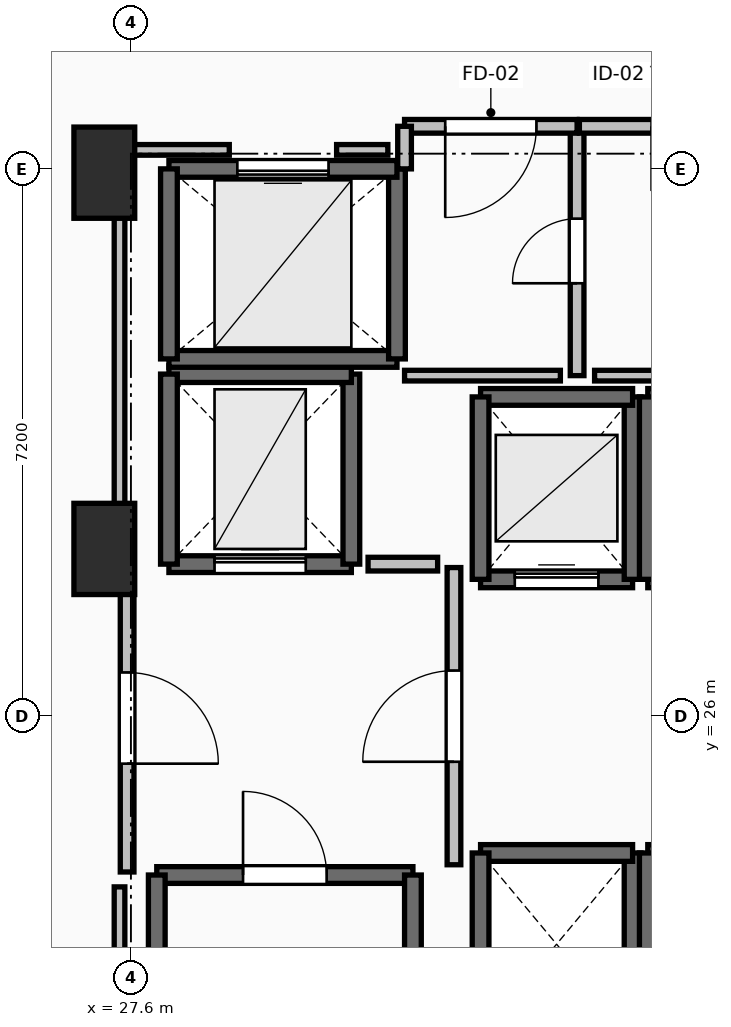
"""IFC4 building model, lengths in metres.
Left out: names, types, materials, properties, quantities, classifications, styles, units other than length and angle.
Written with IfcOpenShell. Run it as: python <this file> out.ifc"""

import sys

from ifc_helpers import new_model, si_unit, direction, frame, frame_2d, origin, origin_2d, place, context, subcontext, project, spatial, rectangle, extrude, element, fill, save


model = new_model("IFC4")
c1 = context("Model", 3, precision=1e-05, world=origin(), true_north=direction((0.0, 1.0)))
c2 = subcontext(c1, "Body", "Model", "MODEL_VIEW")
j1 = project(units=[si_unit("LENGTHUNIT", "METRE"), si_unit("PLANEANGLEUNIT", "RADIAN")], contexts=[c1])
p1 = place(None, origin())
s1 = spatial("IfcSite", under=j1, at=p1, CompositionType="ELEMENT")
p2 = place(p1, origin())
s2 = spatial("IfcBuilding", under=s1, at=p2, CompositionType="ELEMENT")
p3 = place(p2, frame((0.0, 0.0, 82.3)))
s3 = spatial("IfcBuildingStorey", under=s2, at=p3, CompositionType="ELEMENT", Elevation=82.3)
for number, where, z_axis, x_axis in (
    (1, (27.25, 28.2, 0.0), (0.0, 0.0, 1.0), (1.0, 0.0, 0.0)),
    (2, (27.25, 33.15, 0.0), (0.0, 0.0, 1.0), (1.0, 0.0, 0.0)),
):
    element("IfcColumn", number, at=place(p3, frame(where, z_axis=z_axis, x_axis=x_axis)), inside=s3, PredefinedType="PILASTER", context=c2, shape_type="SweptSolid", body=[
        extrude(rectangle(XDim=0.8, YDim=1.2, at=origin_2d()), origin(), (0.0, 0.0, 1.0), 3.5),
    ])
p4 = place(p3, frame((27.94, 23.91, 0.0), z_axis=(0.0, 0.0, 1.0), x_axis=(1.0, 0.0, 0.0)))
e3 = element("IfcWall", 3, at=p4, inside=s3, PredefinedType="SOLIDWALL", context=c2, shape_type="SweptSolid", body=[
    extrude(rectangle(XDim=3.37, YDim=0.22, at=frame_2d((1.685, 0.0))), origin(), (0.0, 0.0, 1.0), 3.24),
])
p5 = place(p4, frame((1.135, 0.0, 0.0)))
e4 = element("IfcOpeningElement", 4, at=p5, cuts=e3, PredefinedType="OPENING", context=c2, shape_type="SweptSolid", body=[
    extrude(rectangle(XDim=1.1, YDim=2.15, at=frame_2d((0.55, 1.075))), frame((0.0, 0.125, 0.0), z_axis=(0.0, -1.0, 0.0), x_axis=(1.0, 0.0, 0.0)), (0.0, 0.0, 1.0), 0.25),
])
for number, where, z_axis, x_axis in (
    (5, (31.31, 23.91, 0.0), (0.0, 0.0, 1.0), (0.0, -1.0, 0.0)),
    (6, (27.94, 16.49, 0.0), (0.0, 0.0, 1.0), (0.0, 1.0, 0.0)),
):
    element("IfcWall", number, at=place(p3, frame(where, z_axis=z_axis, x_axis=x_axis)), inside=s3, PredefinedType="SOLIDWALL", context=c2, shape_type="SweptSolid", body=[
        extrude(rectangle(XDim=7.42, YDim=0.22, at=frame_2d((3.71, 0.0))), origin(), (0.0, 0.0, 1.0), 3.24),
    ])
p6 = place(p3, frame((32.2, 27.8, 0.0), z_axis=(0.0, 0.0, 1.0), x_axis=(1.0, 0.0, 0.0)))
e7 = element("IfcWall", 7, at=p6, inside=s3, PredefinedType="SOLIDWALL", context=c2, shape_type="SweptSolid", body=[
    extrude(rectangle(XDim=2.0, YDim=0.22, at=frame_2d((1.0, 0.0))), origin(), (0.0, 0.0, 1.0), 3.24),
])
p7 = place(p6, frame((0.45, 0.0, 0.0)))
e8 = element("IfcOpeningElement", 8, at=p7, cuts=e7, PredefinedType="OPENING", context=c2, shape_type="SweptSolid", body=[
    extrude(rectangle(XDim=1.1, YDim=2.2, at=frame_2d((0.55, 1.1))), frame((0.0, 0.125, 0.0), z_axis=(0.0, -1.0, 0.0), x_axis=(1.0, 0.0, 0.0)), (0.0, 0.0, 1.0), 0.25),
])
p8 = place(p3, frame((34.2, 27.8, 0.0), z_axis=(0.0, 0.0, 1.0), x_axis=(0.0, 1.0, 0.0)))
e9 = element("IfcWall", 9, at=p8, inside=s3, PredefinedType="SOLIDWALL", context=c2, shape_type="SweptSolid", body=[
    extrude(rectangle(XDim=2.4, YDim=0.22, at=frame_2d((1.2, 0.0))), origin(), (0.0, 0.0, 1.0), 3.24),
])
p9 = place(p3, frame((34.2, 30.2, 0.0), z_axis=(0.0, 0.0, 1.0), x_axis=(-1.0, 0.0, 0.0)))
e10 = element("IfcWall", 10, at=p9, inside=s3, PredefinedType="SOLIDWALL", context=c2, shape_type="SweptSolid", body=[
    extrude(rectangle(XDim=2.0, YDim=0.22, at=frame_2d((1.0, 0.0))), origin(), (0.0, 0.0, 1.0), 3.24),
])
p10 = place(p3, frame((32.2, 30.2, 0.0), z_axis=(0.0, 0.0, 1.0), x_axis=(0.0, -1.0, 0.0)))
e11 = element("IfcWall", 11, at=p10, inside=s3, PredefinedType="SOLIDWALL", context=c2, shape_type="SweptSolid", body=[
    extrude(rectangle(XDim=2.4, YDim=0.22, at=frame_2d((1.2, 0.0))), origin(), (0.0, 0.0, 1.0), 3.24),
])
p11 = place(p3, frame((34.4, 27.8, 0.0), z_axis=(0.0, 0.0, 1.0), x_axis=(1.0, 0.0, 0.0)))
e12 = element("IfcWall", 12, at=p11, inside=s3, PredefinedType="SOLIDWALL", context=c2, shape_type="SweptSolid", body=[
    extrude(rectangle(XDim=2.0, YDim=0.22, at=frame_2d((1.0, 0.0))), origin(), (0.0, 0.0, 1.0), 3.24),
])
p12 = place(p11, frame((0.45, 0.0, 0.0)))
e13 = element("IfcOpeningElement", 13, at=p12, cuts=e12, PredefinedType="OPENING", context=c2, shape_type="SweptSolid", body=[
    extrude(rectangle(XDim=1.1, YDim=2.2, at=frame_2d((0.55, 1.1))), frame((0.0, 0.125, 0.0), z_axis=(0.0, -1.0, 0.0), x_axis=(1.0, 0.0, 0.0)), (0.0, 0.0, 1.0), 0.25),
])
p13 = place(p3, frame((36.4, 30.2, 0.0), z_axis=(0.0, 0.0, 1.0), x_axis=(-1.0, 0.0, 0.0)))
e14 = element("IfcWall", 14, at=p13, inside=s3, PredefinedType="SOLIDWALL", context=c2, shape_type="SweptSolid", body=[
    extrude(rectangle(XDim=2.0, YDim=0.22, at=frame_2d((1.0, 0.0))), origin(), (0.0, 0.0, 1.0), 3.24),
])
for number, where, z_axis, x_axis in (
    (15, (34.4, 30.2, 0.0), (0.0, 0.0, 1.0), (0.0, -1.0, 0.0)),
    (16, (34.2, 21.8, 0.0), (0.0, 0.0, 1.0), (0.0, 1.0, 0.0)),
):
    element("IfcWall", number, at=place(p3, frame(where, z_axis=z_axis, x_axis=x_axis)), inside=s3, PredefinedType="SOLIDWALL", context=c2, shape_type="SweptSolid", body=[
        extrude(rectangle(XDim=2.4, YDim=0.22, at=frame_2d((1.2, 0.0))), origin(), (0.0, 0.0, 1.0), 3.24),
    ])
p14 = place(p3, frame((34.2, 24.2, 0.0), z_axis=(0.0, 0.0, 1.0), x_axis=(-1.0, 0.0, 0.0)))
e17 = element("IfcWall", 17, at=p14, inside=s3, PredefinedType="SOLIDWALL", context=c2, shape_type="SweptSolid", body=[
    extrude(rectangle(XDim=2.0, YDim=0.22, at=frame_2d((1.0, 0.0))), origin(), (0.0, 0.0, 1.0), 3.24),
])
p15 = place(p3, frame((32.2, 24.2, 0.0), z_axis=(0.0, 0.0, 1.0), x_axis=(0.0, -1.0, 0.0)))
e18 = element("IfcWall", 18, at=p15, inside=s3, PredefinedType="SOLIDWALL", context=c2, shape_type="SweptSolid", body=[
    extrude(rectangle(XDim=2.4, YDim=0.22, at=frame_2d((1.2, 0.0))), origin(), (0.0, 0.0, 1.0), 3.24),
])
p16 = place(p3, frame((36.4, 24.2, 0.0), z_axis=(0.0, 0.0, 1.0), x_axis=(-1.0, 0.0, 0.0)))
e19 = element("IfcWall", 19, at=p16, inside=s3, PredefinedType="SOLIDWALL", context=c2, shape_type="SweptSolid", body=[
    extrude(rectangle(XDim=2.0, YDim=0.22, at=frame_2d((1.0, 0.0))), origin(), (0.0, 0.0, 1.0), 3.24),
])
p17 = place(p3, frame((34.4, 24.2, 0.0), z_axis=(0.0, 0.0, 1.0), x_axis=(0.0, -1.0, 0.0)))
e20 = element("IfcWall", 20, at=p17, inside=s3, PredefinedType="SOLIDWALL", context=c2, shape_type="SweptSolid", body=[
    extrude(rectangle(XDim=2.4, YDim=0.22, at=frame_2d((1.2, 0.0))), origin(), (0.0, 0.0, 1.0), 3.24),
])
p18 = place(p3, frame((28.1, 28.0, 0.0), z_axis=(0.0, 0.0, 1.0), x_axis=(1.0, 0.0, 0.0)))
e21 = element("IfcWall", 21, at=p18, inside=s3, PredefinedType="SHEAR", context=c2, shape_type="SweptSolid", body=[
    extrude(rectangle(XDim=2.4, YDim=0.22, at=frame_2d((1.2, 0.0))), origin(), (0.0, 0.0, 1.0), 3.24),
])
p19 = place(p18, frame((0.6, 0.0, 0.0)))
e22 = element("IfcOpeningElement", 22, at=p19, cuts=e21, PredefinedType="OPENING", context=c2, shape_type="SweptSolid", body=[
    extrude(rectangle(XDim=1.2, YDim=2.2, at=frame_2d((0.6, 1.1))), frame((0.0, 0.125, 0.0), z_axis=(0.0, -1.0, 0.0), x_axis=(1.0, 0.0, 0.0)), (0.0, 0.0, 1.0), 0.25),
])
p20 = place(p3, frame((30.5, 28.0, 0.0), z_axis=(0.0, 0.0, 1.0), x_axis=(0.0, 1.0, 0.0)))
e23 = element("IfcWall", 23, at=p20, inside=s3, PredefinedType="SHEAR", context=c2, shape_type="SweptSolid", body=[
    extrude(rectangle(XDim=2.5, YDim=0.22, at=frame_2d((1.25, 0.0))), origin(), (0.0, 0.0, 1.0), 3.24),
])
p21 = place(p3, frame((30.5, 30.5, 0.0), z_axis=(0.0, 0.0, 1.0), x_axis=(-1.0, 0.0, 0.0)))
e24 = element("IfcWall", 24, at=p21, inside=s3, PredefinedType="SHEAR", context=c2, shape_type="SweptSolid", body=[
    extrude(rectangle(XDim=2.4, YDim=0.22, at=frame_2d((1.2, 0.0))), origin(), (0.0, 0.0, 1.0), 3.24),
])
p22 = place(p3, frame((28.1, 30.5, 0.0), z_axis=(0.0, 0.0, 1.0), x_axis=(0.0, -1.0, 0.0)))
e25 = element("IfcWall", 25, at=p22, inside=s3, PredefinedType="SHEAR", context=c2, shape_type="SweptSolid", body=[
    extrude(rectangle(XDim=2.5, YDim=0.22, at=frame_2d((1.25, 0.0))), origin(), (0.0, 0.0, 1.0), 3.24),
])
p23 = place(p3, frame((28.1, 30.7, 0.0), z_axis=(0.0, 0.0, 1.0), x_axis=(1.0, 0.0, 0.0)))
e26 = element("IfcWall", 26, at=p23, inside=s3, PredefinedType="SOLIDWALL", context=c2, shape_type="SweptSolid", body=[
    extrude(rectangle(XDim=3.0, YDim=0.22, at=frame_2d((1.5, 0.0))), origin(), (0.0, 0.0, 1.0), 3.24),
])
p24 = place(p3, frame((31.1, 30.7, 0.0), z_axis=(0.0, 0.0, 1.0), x_axis=(0.0, 1.0, 0.0)))
e27 = element("IfcWall", 27, at=p24, inside=s3, PredefinedType="SOLIDWALL", context=c2, shape_type="SweptSolid", body=[
    extrude(rectangle(XDim=2.5, YDim=0.22, at=frame_2d((1.25, 0.0))), origin(), (0.0, 0.0, 1.0), 3.24),
])
p25 = place(p3, frame((31.1, 33.2, 0.0), z_axis=(0.0, 0.0, 1.0), x_axis=(-1.0, 0.0, 0.0)))
e28 = element("IfcWall", 28, at=p25, inside=s3, PredefinedType="SOLIDWALL", context=c2, shape_type="SweptSolid", body=[
    extrude(rectangle(XDim=3.0, YDim=0.22, at=frame_2d((1.5, 0.0))), origin(), (0.0, 0.0, 1.0), 3.24),
])
p26 = place(p25, frame((0.9, 0.0, 0.0)))
e29 = element("IfcOpeningElement", 29, at=p26, cuts=e28, PredefinedType="OPENING", context=c2, shape_type="SweptSolid", body=[
    extrude(rectangle(XDim=1.2, YDim=2.2, at=frame_2d((0.6, 1.1))), frame((0.0, 0.125, 0.0), z_axis=(0.0, -1.0, 0.0), x_axis=(1.0, 0.0, 0.0)), (0.0, 0.0, 1.0), 0.25),
])
p27 = place(p3, frame((28.1, 33.2, 0.0), z_axis=(0.0, 0.0, 1.0), x_axis=(0.0, -1.0, 0.0)))
e30 = element("IfcWall", 30, at=p27, inside=s3, PredefinedType="SOLIDWALL", context=c2, shape_type="SweptSolid", body=[
    extrude(rectangle(XDim=2.5, YDim=0.22, at=frame_2d((1.25, 0.0))), origin(), (0.0, 0.0, 1.0), 3.24),
])
p28 = place(p3, frame((31.85, 24.045, 0.0), z_axis=(0.0, 0.0, 1.0), x_axis=(0.0, 1.0, 0.0)))
e31 = element("IfcWall", 31, at=p28, inside=s3, PredefinedType="PARTITIONING", context=c2, shape_type="SweptSolid", body=[
    extrude(rectangle(XDim=3.91, YDim=0.18, at=frame_2d((1.955, 0.0))), origin(), (0.0, 0.0, 1.0), 3.24),
])
p29 = place(p28, frame((1.355, 0.0, 0.0)))
e32 = element("IfcOpeningElement", 32, at=p29, cuts=e31, PredefinedType="OPENING", context=c2, shape_type="SweptSolid", body=[
    extrude(rectangle(XDim=1.2, YDim=2.15, at=frame_2d((0.6, 1.075))), frame((0.0, 0.105, 0.0), z_axis=(0.0, -1.0, 0.0), x_axis=(1.0, 0.0, 0.0)), (0.0, 0.0, 1.0), 0.21),
])
p30 = place(p3, frame((27.55, 28.0, 0.0), z_axis=(0.0, 0.0, 1.0), x_axis=(0.0, -1.0, 0.0)))
e33 = element("IfcWall", 33, at=p30, inside=s3, PredefinedType="PARTITIONING", context=c2, shape_type="SweptSolid", body=[
    extrude(rectangle(XDim=4.05, YDim=0.18, at=frame_2d((2.025, 0.0))), origin(), (0.0, 0.0, 1.0), 3.24),
])
p31 = place(p30, frame((1.425, 0.0, 0.0)))
e34 = element("IfcOpeningElement", 34, at=p31, cuts=e33, PredefinedType="OPENING", context=c2, shape_type="SweptSolid", body=[
    extrude(rectangle(XDim=1.2, YDim=2.15, at=frame_2d((0.6, 1.075))), frame((0.0, 0.105, 0.0), z_axis=(0.0, -1.0, 0.0), x_axis=(1.0, 0.0, 0.0)), (0.0, 0.0, 1.0), 0.21),
])
p32 = place(p3, frame((33.47, 30.48, 0.0), z_axis=(0.0, 0.0, 1.0), x_axis=(0.0, 1.0, 0.0)))
e35 = element("IfcWall", 35, at=p32, inside=s3, PredefinedType="PARTITIONING", context=c2, shape_type="SweptSolid", body=[
    extrude(rectangle(XDim=3.28, YDim=0.18, at=frame_2d((1.64, 0.0))), origin(), (0.0, 0.0, 1.0), 3.24),
])
p33 = place(p32, frame((1.215, 0.0, 0.0)))
e36 = element("IfcOpeningElement", 36, at=p33, cuts=e35, PredefinedType="OPENING", context=c2, shape_type="SweptSolid", body=[
    extrude(rectangle(XDim=0.85, YDim=2.1, at=frame_2d((0.425, 1.05))), frame((0.0, 0.105, 0.0), z_axis=(0.0, -1.0, 0.0), x_axis=(1.0, 0.0, 0.0)), (0.0, 0.0, 1.0), 0.21),
])
p34 = place(p3, frame((33.47, 33.76, 0.0), z_axis=(0.0, 0.0, 1.0), x_axis=(-1.0, 0.0, 0.0)))
e37 = element("IfcWall", 37, at=p34, inside=s3, PredefinedType="PARTITIONING", context=c2, shape_type="SweptSolid", body=[
    extrude(rectangle(XDim=2.27, YDim=0.18, at=frame_2d((1.135, 0.0))), origin(), (0.0, 0.0, 1.0), 3.24),
])
p35 = place(p34, frame((0.535, 0.0, 0.0)))
e38 = element("IfcOpeningElement", 38, at=p35, cuts=e37, PredefinedType="OPENING", context=c2, shape_type="SweptSolid", body=[
    extrude(rectangle(XDim=1.2, YDim=2.15, at=frame_2d((0.6, 1.075))), frame((0.0, 0.105, 0.0), z_axis=(0.0, -1.0, 0.0), x_axis=(1.0, 0.0, 0.0)), (0.0, 0.0, 1.0), 0.21),
])
p36 = place(p3, frame((31.2, 33.76, 0.0), z_axis=(0.0, 0.0, 1.0), x_axis=(0.0, -1.0, 0.0)))
e39 = element("IfcWall", 39, at=p36, inside=s3, PredefinedType="PARTITIONING", context=c2, shape_type="SweptSolid", body=[
    extrude(rectangle(XDim=0.56, YDim=0.18, at=frame_2d((0.28, 0.0))), origin(), (0.0, 0.0, 1.0), 3.24),
])
p37 = place(p3, frame((36.25, 33.76, 0.0), z_axis=(0.0, 0.0, 1.0), x_axis=(-1.0, 0.0, 0.0)))
e40 = element("IfcWall", 40, at=p37, inside=s3, PredefinedType="PARTITIONING", context=c2, shape_type="SweptSolid", body=[
    extrude(rectangle(XDim=2.75, YDim=0.18, at=frame_2d((1.375, 0.0))), origin(), (0.0, 0.0, 1.0), 3.24),
])
p38 = place(p37, frame((0.95, 0.0, 0.0)))
e41 = element("IfcOpeningElement", 41, at=p38, cuts=e40, PredefinedType="OPENING", context=c2, shape_type="SweptSolid", body=[
    extrude(rectangle(XDim=0.85, YDim=2.1, at=frame_2d((0.425, 1.05))), frame((0.0, 0.105, 0.0), z_axis=(0.0, -1.0, 0.0), x_axis=(1.0, 0.0, 0.0)), (0.0, 0.0, 1.0), 0.21),
])
p39 = place(p3, frame((31.635, 28.0, 0.0), z_axis=(0.0, 0.0, 1.0), x_axis=(-1.0, 0.0, 0.0)))
e42 = element("IfcWall", 42, at=p39, inside=s3, PredefinedType="PARTITIONING", context=c2, shape_type="SweptSolid", body=[
    extrude(rectangle(XDim=0.915, YDim=0.18, at=frame_2d((0.458, 0.0))), origin(), (0.0, 0.0, 1.0), 3.24),
])
p40 = place(p3, frame((31.2, 30.48, 0.0), z_axis=(0.0, 0.0, 1.0), x_axis=(1.0, 0.0, 0.0)))
e43 = element("IfcWall", 43, at=p40, inside=s3, PredefinedType="PARTITIONING", context=c2, shape_type="SweptSolid", body=[
    extrude(rectangle(XDim=2.05, YDim=0.14, at=frame_2d((1.025, 0.0))), origin(), (0.0, 0.0, 1.0), 3.24),
])
p41 = place(p3, frame((33.7, 30.48, 0.0), z_axis=(0.0, 0.0, 1.0), x_axis=(1.0, 0.0, 0.0)))
e44 = element("IfcWall", 44, at=p41, inside=s3, PredefinedType="PARTITIONING", context=c2, shape_type="SweptSolid", body=[
    extrude(rectangle(XDim=2.33, YDim=0.14, at=frame_2d((1.165, 0.0))), origin(), (0.0, 0.0, 1.0), 2.432),
])
p42 = place(p3, frame((27.45, 16.24, 0.0), z_axis=(0.0, 0.0, 1.0), x_axis=(0.0, 1.0, 0.0)))
e45 = element("IfcWall", 45, at=p42, inside=s3, PredefinedType="PARTITIONING", context=c2, shape_type="SweptSolid", body=[
    extrude(rectangle(XDim=7.514, YDim=0.14, at=frame_2d((3.757, 0.0))), origin(), (0.0, 0.0, 1.0), 2.432),
])
p43 = place(p3, frame((27.45, 28.196, 0.0), z_axis=(0.0, 0.0, 1.0), x_axis=(0.0, 1.0, 0.0)))
e46 = element("IfcWall", 46, at=p43, inside=s3, PredefinedType="PARTITIONING", context=c2, shape_type="SweptSolid", body=[
    extrude(rectangle(XDim=5.254, YDim=0.14, at=frame_2d((2.627, 0.0))), origin(), (0.0, 0.0, 1.0), 2.432),
])
p44 = place(p3, frame((27.45, 33.45, 0.0), z_axis=(0.0, 0.0, 1.0), x_axis=(1.0, 0.0, 0.0)))
e47 = element("IfcWall", 47, at=p44, inside=s3, PredefinedType="PARTITIONING", context=c2, shape_type="SweptSolid", body=[
    extrude(rectangle(XDim=1.444, YDim=0.14, at=frame_2d((0.722, 0.0))), origin(), (0.0, 0.0, 1.0), 2.432),
])
p45 = place(p3, frame((30.306, 33.45, 0.0), z_axis=(0.0, 0.0, 1.0), x_axis=(1.0, 0.0, 0.0)))
e48 = element("IfcWall", 48, at=p45, inside=s3, PredefinedType="PARTITIONING", context=c2, shape_type="SweptSolid", body=[
    extrude(rectangle(XDim=0.674, YDim=0.14, at=frame_2d((0.337, 0.0))), origin(), (0.0, 0.0, 1.0), 3.24),
])
p46 = place(p5, origin())
e49 = element("IfcDoor", 49, at=p46, inside=s3, OperationType="SINGLE_SWING_LEFT", PredefinedType="DOOR", context=c2, shape_type="SweptSolid", body=[
    extrude(rectangle(XDim=1.1, YDim=2.15, at=frame_2d((0.55, 1.075))), frame((0.0, 0.025, 0.0), z_axis=(0.0, -1.0, 0.0), x_axis=(1.0, 0.0, 0.0)), (0.0, 0.0, 1.0), 0.05),
])
fill(e4, e49)
p47 = place(p7, origin())
e50 = element("IfcDoor", 50, at=p47, inside=s3, OperationType="SLIDING_TO_LEFT", PredefinedType="DOOR", context=c2, shape_type="SweptSolid", body=[
    extrude(rectangle(XDim=1.1, YDim=2.2, at=frame_2d((0.55, 1.1))), frame((0.0, 0.025, 0.0), z_axis=(0.0, -1.0, 0.0), x_axis=(1.0, 0.0, 0.0)), (0.0, 0.0, 1.0), 0.05),
])
fill(e8, e50)
p48 = place(p19, origin())
e51 = element("IfcDoor", 51, at=p48, inside=s3, OperationType="SLIDING_TO_LEFT", PredefinedType="DOOR", context=c2, shape_type="SweptSolid", body=[
    extrude(rectangle(XDim=1.2, YDim=2.2, at=frame_2d((0.6, 1.1))), frame((0.0, 0.025, 0.0), z_axis=(0.0, -1.0, 0.0), x_axis=(1.0, 0.0, 0.0)), (0.0, 0.0, 1.0), 0.05),
])
fill(e22, e51)
p49 = place(p26, origin())
e52 = element("IfcDoor", 52, at=p49, inside=s3, OperationType="SLIDING_TO_LEFT", PredefinedType="DOOR", context=c2, shape_type="SweptSolid", body=[
    extrude(rectangle(XDim=1.2, YDim=2.2, at=frame_2d((0.6, 1.1))), frame((0.0, 0.025, 0.0), z_axis=(0.0, -1.0, 0.0), x_axis=(1.0, 0.0, 0.0)), (0.0, 0.0, 1.0), 0.05),
])
fill(e29, e52)
p50 = place(p29, origin())
e53 = element("IfcDoor", 53, at=p50, inside=s3, OperationType="SINGLE_SWING_LEFT", PredefinedType="DOOR", context=c2, shape_type="SweptSolid", body=[
    extrude(rectangle(XDim=1.2, YDim=2.15, at=frame_2d((0.6, 1.075))), frame((0.0, 0.025, 0.0), z_axis=(0.0, -1.0, 0.0), x_axis=(1.0, 0.0, 0.0)), (0.0, 0.0, 1.0), 0.05),
])
fill(e32, e53)
p51 = place(p31, origin())
e54 = element("IfcDoor", 54, at=p51, inside=s3, OperationType="SINGLE_SWING_RIGHT", PredefinedType="DOOR", context=c2, shape_type="SweptSolid", body=[
    extrude(rectangle(XDim=1.2, YDim=2.15, at=frame_2d((0.6, 1.075))), frame((0.0, 0.025, 0.0), z_axis=(0.0, -1.0, 0.0), x_axis=(1.0, 0.0, 0.0)), (0.0, 0.0, 1.0), 0.05),
])
fill(e34, e54)
p52 = place(p33, origin())
e55 = element("IfcDoor", 55, at=p52, inside=s3, OperationType="SINGLE_SWING_LEFT", PredefinedType="DOOR", context=c2, shape_type="SweptSolid", body=[
    extrude(rectangle(XDim=0.85, YDim=2.1, at=frame_2d((0.425, 1.05))), frame((0.0, 0.025, 0.0), z_axis=(0.0, -1.0, 0.0), x_axis=(1.0, 0.0, 0.0)), (0.0, 0.0, 1.0), 0.05),
])
fill(e36, e55)
p53 = place(p35, origin())
e56 = element("IfcDoor", 56, at=p53, inside=s3, OperationType="SINGLE_SWING_RIGHT", PredefinedType="DOOR", context=c2, shape_type="SweptSolid", body=[
    extrude(rectangle(XDim=1.2, YDim=2.15, at=frame_2d((0.6, 1.075))), frame((0.0, 0.025, 0.0), z_axis=(0.0, -1.0, 0.0), x_axis=(1.0, 0.0, 0.0)), (0.0, 0.0, 1.0), 0.05),
])
fill(e38, e56)
save(model, sys.argv[1])
